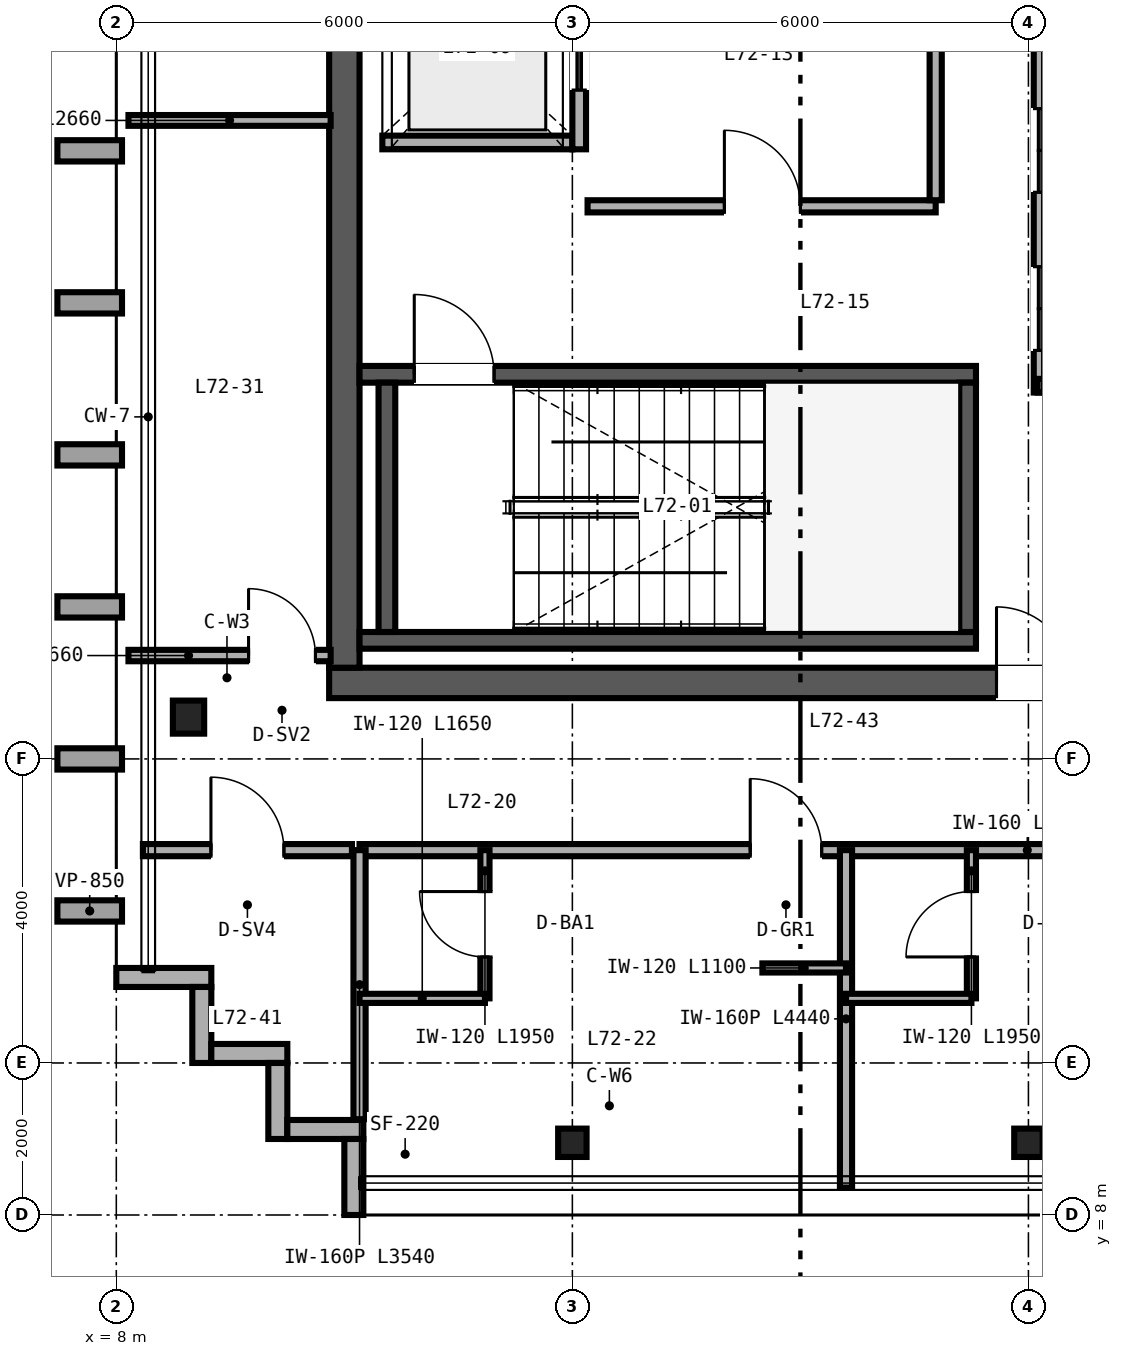
"""IFC4 building model, lengths in metres.
Left out: names, types, materials, properties, quantities, classifications, styles, units other than length and angle.
Written with IfcOpenShell. Run it as: python <this file> out.ifc"""

import sys

from ifc_helpers import new_model, si_unit, direction, frame, frame_2d, origin, origin_2d, place, context, subcontext, project, spatial, rectangle, i_section, extrude, source, transform, mapped, element, fill, save


model = new_model("IFC4")
c1 = context("Model", 3, precision=1e-05, world=origin(), true_north=direction((0.0, 1.0)))
c2 = subcontext(c1, "Body", "Model", "MODEL_VIEW")
j1 = project(units=[si_unit("LENGTHUNIT", "METRE"), si_unit("PLANEANGLEUNIT", "RADIAN")], contexts=[c1])
p1 = place(None, origin())
s1 = spatial("IfcSite", under=j1, at=p1, CompositionType="ELEMENT")
p2 = place(p1, origin())
s2 = spatial("IfcBuilding", under=s1, at=p2, CompositionType="ELEMENT")
p3 = place(p2, frame((0.0, 0.0, 283.2)))
s3 = spatial("IfcBuildingStorey", under=s2, at=p3, CompositionType="ELEMENT", Elevation=283.2)
p4 = place(p3, frame((10.8, 15.0, 0.0), z_axis=(0.0, 0.0, 1.0), x_axis=(1.0, 0.0, 0.0)))
e1 = element("IfcWall", 1, at=p4, inside=s3, PredefinedType="SHEAR", context=c2, shape_type="SweptSolid", body=[
    extrude(rectangle(XDim=12.4, YDim=0.4, at=frame_2d((6.2, 0.0))), origin(), (0.0, 0.0, 1.0), 3.38),
])
p5 = place(p4, frame((8.78, 0.0, 0.0)))
e2 = element("IfcOpeningElement", 2, at=p5, cuts=e1, PredefinedType="OPENING", context=c2, shape_type="SweptSolid", body=[
    extrude(rectangle(XDim=1.0, YDim=2.15, at=frame_2d((0.5, 1.075))), frame((0.0, 0.21, 0.0), z_axis=(0.0, -1.0, 0.0), x_axis=(1.0, 0.0, 0.0)), (0.0, 0.0, 1.0), 0.42),
])
p6 = place(p3, frame((11.0, 15.2, 0.0), z_axis=(0.0, 0.0, 1.0), x_axis=(0.0, 1.0, 0.0)))
e3 = element("IfcWall", 3, at=p6, inside=s3, PredefinedType="SHEAR", context=c2, shape_type="SweptSolid", body=[
    extrude(rectangle(XDim=21.6, YDim=0.4, at=frame_2d((10.8, 0.0))), origin(), (0.0, 0.0, 1.0), 3.38),
])
p7 = place(p3, frame((11.2, 15.56, 0.0), z_axis=(0.0, 0.0, 1.0), x_axis=(1.0, 0.0, 0.0)))
e4 = element("IfcWall", 4, at=p7, inside=s3, PredefinedType="SHEAR", context=c2, shape_type="SweptSolid", body=[
    extrude(rectangle(XDim=8.11, YDim=0.22, at=frame_2d((4.055, 0.0))), origin(), (0.0, 0.0, 1.0), 3.4),
])
p8 = place(p3, frame((11.2, 19.06, 0.0), z_axis=(0.0, 0.0, 1.0), x_axis=(1.0, 0.0, 0.0)))
e5 = element("IfcWall", 5, at=p8, inside=s3, PredefinedType="SHEAR", context=c2, shape_type="SweptSolid", body=[
    extrude(rectangle(XDim=8.11, YDim=0.22, at=frame_2d((4.055, 0.0))), origin(), (0.0, 0.0, 1.0), 3.4),
])
p9 = place(p8, frame((0.72, 0.0, 0.0)))
e6 = element("IfcOpeningElement", 6, at=p9, cuts=e5, PredefinedType="OPENING", context=c2, shape_type="SweptSolid", body=[
    extrude(rectangle(XDim=1.05, YDim=2.15, at=frame_2d((0.525, 1.075))), frame((0.0, 0.12, 0.0), z_axis=(0.0, -1.0, 0.0), x_axis=(1.0, 0.0, 0.0)), (0.0, 0.0, 1.0), 0.24),
])
for number, where, z_axis, x_axis in (
    (7, (11.56, 15.67, 0.0), (0.0, 0.0, 1.0), (0.0, 1.0, 0.0)),
    (8, (19.2, 15.67, 0.0), (0.0, 0.0, 1.0), (0.0, 1.0, 0.0)),
):
    element("IfcWall", number, at=place(p3, frame(where, z_axis=z_axis, x_axis=x_axis)), inside=s3, PredefinedType="SHEAR", context=c2, shape_type="SweptSolid", body=[
        extrude(rectangle(XDim=3.28, YDim=0.22, at=frame_2d((1.64, 0.0))), origin(), (0.0, 0.0, 1.0), 3.4),
    ])
m1 = source(origin(), c2, "Body", "SweptSolid", [
    extrude(i_section(OverallWidth=0.412, OverallDepth=0.435, WebThickness=0.036, FlangeThickness=0.057, FilletRadius=0.025, at=origin_2d()), origin(), (0.0, 0.0, 1.0), 3.38),
])
p10 = place(p3, frame((8.95, 14.55, 0.0), z_axis=(0.0, 0.0, 1.0), x_axis=(1.0, 0.0, 0.0)))
e9 = element("IfcColumn", 9, at=p10, inside=s3, PredefinedType="COLUMN", context=c2, shape_type="MappedRepresentation", body=[
    mapped(m1, transform((0.0, 0.0, 0.0), scale=1.0)),
])
m2 = source(origin(), c2, "Body", "SweptSolid", [
    extrude(i_section(OverallWidth=0.374, OverallDepth=0.373, WebThickness=0.016, FlangeThickness=0.026, FilletRadius=0.025, at=origin_2d()), origin(), (0.0, 0.0, 1.0), 3.38),
])
for number, where, z_axis, x_axis in (
    (10, (14.0, 8.95, 0.0), (0.0, 0.0, 1.0), (1.0, 0.0, 0.0)),
    (11, (20.0, 8.95, 0.0), (0.0, 0.0, 1.0), (1.0, 0.0, 0.0)),
):
    element("IfcColumn", number, at=place(p3, frame(where, z_axis=z_axis, x_axis=x_axis)), inside=s3, PredefinedType="COLUMN", context=c2, shape_type="MappedRepresentation", body=[
        mapped(m2, transform((0.0, 0.0, 0.0), scale=1.0)),
    ])
p11 = place(p3, frame((8.0, 11.125, 0.0), z_axis=(0.0, 0.0, 1.0), x_axis=(1.0, 0.0, 0.0)))
e12 = element("IfcWall", 12, at=p11, inside=s3, PredefinedType="SOLIDWALL", context=c2, shape_type="SweptSolid", body=[
    extrude(rectangle(XDim=1.25, YDim=0.25, at=frame_2d((0.625, 0.0))), origin(), (0.0, 0.0, 1.0), 3.38),
])
for number, where, z_axis, x_axis in (
    (13, (9.125, 11.0, 0.0), (0.0, 0.0, 1.0), (0.0, -1.0, 0.0)),
    (14, (9.25, 10.125, 0.0), (0.0, 0.0, 1.0), (1.0, 0.0, 0.0)),
    (15, (10.125, 10.0, 0.0), (0.0, 0.0, 1.0), (0.0, -1.0, 0.0)),
    (16, (10.25, 9.125, 0.0), (0.0, 0.0, 1.0), (1.0, 0.0, 0.0)),
    (17, (11.125, 9.0, 0.0), (0.0, 0.0, 1.0), (0.0, -1.0, 0.0)),
):
    element("IfcWall", number, at=place(p3, frame(where, z_axis=z_axis, x_axis=x_axis)), inside=s3, PredefinedType="SOLIDWALL", context=c2, shape_type="SweptSolid", body=[
        extrude(rectangle(XDim=1.0, YDim=0.25, at=frame_2d((0.5, 0.0))), origin(), (0.0, 0.0, 1.0), 3.38),
    ])
p12 = place(p3, frame((20.16, 18.82, 0.0), z_axis=(0.0, 0.0, 1.0), x_axis=(0.0, 1.0, 0.0)))
e18 = element("IfcWall", 18, at=p12, inside=s3, PredefinedType="SOLIDWALL", context=c2, shape_type="SweptSolid", body=[
    extrude(rectangle(XDim=6.32, YDim=0.18, at=frame_2d((3.16, 0.0))), origin(), (0.0, 0.0, 1.0), 2.48),
])
p13 = place(p12, frame((0.555, 0.0, 0.0)))
e19 = element("IfcOpeningElement", 19, at=p13, cuts=e18, PredefinedType="OPENING", context=c2, shape_type="SweptSolid", body=[
    extrude(rectangle(XDim=1.1, YDim=2.2, at=frame_2d((0.55, 1.1))), frame((0.0, 0.1, 0.0), z_axis=(0.0, -1.0, 0.0), x_axis=(1.0, 0.0, 0.0)), (0.0, 0.0, 1.0), 0.2),
])
p14 = place(p12, frame((2.635, 0.0, 0.0)))
e20 = element("IfcOpeningElement", 20, at=p14, cuts=e18, PredefinedType="OPENING", context=c2, shape_type="SweptSolid", body=[
    extrude(rectangle(XDim=1.1, YDim=2.2, at=frame_2d((0.55, 1.1))), frame((0.0, 0.1, 0.0), z_axis=(0.0, -1.0, 0.0), x_axis=(1.0, 0.0, 0.0)), (0.0, 0.0, 1.0), 0.2),
])
p15 = place(p12, frame((4.69, 0.0, 0.0)))
e21 = element("IfcOpeningElement", 21, at=p15, cuts=e18, PredefinedType="OPENING", context=c2, shape_type="SweptSolid", body=[
    extrude(rectangle(XDim=1.1, YDim=2.2, at=frame_2d((0.55, 1.1))), frame((0.0, 0.1, 0.0), z_axis=(0.0, -1.0, 0.0), x_axis=(1.0, 0.0, 0.0)), (0.0, 0.0, 1.0), 0.2),
])
p16 = place(p3, frame((20.12, 18.91, 0.0), z_axis=(0.0, 0.0, 1.0), x_axis=(1.0, 0.0, 0.0)))
e22 = element("IfcWall", 22, at=p16, inside=s3, PredefinedType="SOLIDWALL", context=c2, shape_type="SweptSolid", body=[
    extrude(rectangle(XDim=2.63, YDim=0.18, at=frame_2d((1.315, 0.0))), origin(), (0.0, 0.0, 1.0), 3.38),
])
p17 = place(p3, frame((11.5, 22.11, 0.0), z_axis=(0.0, 0.0, 1.0), x_axis=(1.0, 0.0, 0.0)))
e23 = element("IfcWall", 23, at=p17, inside=s3, PredefinedType="SOLIDWALL", context=c2, shape_type="SweptSolid", body=[
    extrude(rectangle(XDim=2.5, YDim=0.18, at=frame_2d((1.25, 0.0))), origin(), (0.0, 0.0, 1.0), 3.38),
])
p18 = place(p3, frame((14.09, 22.02, 0.0), z_axis=(0.0, 0.0, 1.0), x_axis=(0.0, 1.0, 0.0)))
e24 = element("IfcWall", 24, at=p18, inside=s3, PredefinedType="SOLIDWALL", context=c2, shape_type="SweptSolid", body=[
    extrude(rectangle(XDim=2.66, YDim=0.18, at=frame_2d((1.33, 0.0))), origin(), (0.0, 0.0, 1.0), 3.38),
])
p19 = place(p18, frame((0.78, 0.0, 0.0)))
e25 = element("IfcOpeningElement", 25, at=p19, cuts=e24, PredefinedType="OPENING", context=c2, shape_type="SweptSolid", body=[
    extrude(rectangle(XDim=1.1, YDim=2.2, at=frame_2d((0.55, 1.1))), frame((0.0, 0.1, 0.0), z_axis=(0.0, -1.0, 0.0), x_axis=(1.0, 0.0, 0.0)), (0.0, 0.0, 1.0), 0.2),
])
p20 = place(p3, frame((14.2, 21.27, 0.0), z_axis=(0.0, 0.0, 1.0), x_axis=(1.0, 0.0, 0.0)))
e26 = element("IfcWall", 26, at=p20, inside=s3, PredefinedType="PARTITIONING", context=c2, shape_type="SweptSolid", body=[
    extrude(rectangle(XDim=4.58, YDim=0.16, at=frame_2d((2.29, 0.0))), origin(), (0.0, 0.0, 1.0), 3.38),
])
p21 = place(p20, frame((1.8, 0.0, 0.0)))
e27 = element("IfcOpeningElement", 27, at=p21, cuts=e26, PredefinedType="OPENING", context=c2, shape_type="SweptSolid", body=[
    extrude(rectangle(XDim=1.0, YDim=2.15, at=frame_2d((0.5, 1.075))), frame((0.0, 0.09, 0.0), z_axis=(0.0, -1.0, 0.0), x_axis=(1.0, 0.0, 0.0)), (0.0, 0.0, 1.0), 0.18),
])
p22 = place(p3, frame((18.78, 21.35, 0.0), z_axis=(0.0, 0.0, 1.0), x_axis=(0.0, 1.0, 0.0)))
e28 = element("IfcWall", 28, at=p22, inside=s3, PredefinedType="PARTITIONING", context=c2, shape_type="SweptSolid", body=[
    extrude(rectangle(XDim=3.81, YDim=0.16, at=frame_2d((1.905, 0.0))), origin(), (0.0, 0.0, 1.0), 3.38),
])
p23 = place(p3, frame((11.2, 12.8, 0.0), z_axis=(0.0, 0.0, 1.0), x_axis=(1.0, 0.0, 0.0)))
e29 = element("IfcWall", 29, at=p23, inside=s3, PredefinedType="PARTITIONING", context=c2, shape_type="SweptSolid", body=[
    extrude(rectangle(XDim=12.75, YDim=0.16, at=frame_2d((6.375, 0.0))), origin(), (0.0, 0.0, 1.0), 3.38),
])
p24 = place(p23, frame((5.14, 0.0, 0.0)))
e30 = element("IfcOpeningElement", 30, at=p24, cuts=e29, PredefinedType="OPENING", context=c2, shape_type="SweptSolid", body=[
    extrude(rectangle(XDim=0.94, YDim=2.15, at=frame_2d((0.47, 1.075))), frame((0.0, 0.09, 0.0), z_axis=(0.0, -1.0, 0.0), x_axis=(1.0, 0.0, 0.0)), (0.0, 0.0, 1.0), 0.18),
])
p25 = place(p23, frame((11.49, 0.0, 0.0)))
e31 = element("IfcOpeningElement", 31, at=p25, cuts=e29, PredefinedType="OPENING", context=c2, shape_type="SweptSolid", body=[
    extrude(rectangle(XDim=0.94, YDim=2.15, at=frame_2d((0.47, 1.075))), frame((0.0, 0.09, 0.0), z_axis=(0.0, -1.0, 0.0), x_axis=(1.0, 0.0, 0.0)), (0.0, 0.0, 1.0), 0.18),
])
p26 = place(p3, frame((11.2, 9.26, 0.0), z_axis=(0.0, 0.0, 1.0), x_axis=(0.0, 1.0, 0.0)))
e32 = element("IfcWall", 32, at=p26, inside=s3, PredefinedType="PARTITIONING", context=c2, shape_type="SweptSolid", body=[
    extrude(rectangle(XDim=3.54, YDim=0.16, at=frame_2d((1.77, 0.0))), origin(), (0.0, 0.0, 1.0), 3.38),
])
p27 = place(p3, frame((17.6, 8.36, 0.0), z_axis=(0.0, 0.0, 1.0), x_axis=(0.0, 1.0, 0.0)))
e33 = element("IfcWall", 33, at=p27, inside=s3, PredefinedType="PARTITIONING", context=c2, shape_type="SweptSolid", body=[
    extrude(rectangle(XDim=4.44, YDim=0.16, at=frame_2d((2.22, 0.0))), origin(), (0.0, 0.0, 1.0), 2.687),
])
p28 = place(p3, frame((12.85, 10.85, 0.0), z_axis=(0.0, 0.0, 1.0), x_axis=(0.0, 1.0, 0.0)))
e34 = element("IfcWall", 34, at=p28, inside=s3, PredefinedType="PARTITIONING", context=c2, shape_type="SweptSolid", body=[
    extrude(rectangle(XDim=1.95, YDim=0.12, at=frame_2d((0.975, 0.0))), origin(), (0.0, 0.0, 1.0), 3.38),
])
p29 = place(p28, frame((0.545, 0.0, 0.0)))
e35 = element("IfcOpeningElement", 35, at=p29, cuts=e34, PredefinedType="OPENING", context=c2, shape_type="SweptSolid", body=[
    extrude(rectangle(XDim=0.86, YDim=2.1, at=frame_2d((0.43, 1.05))), frame((0.0, 0.07, 0.0), z_axis=(0.0, -1.0, 0.0), x_axis=(1.0, 0.0, 0.0)), (0.0, 0.0, 1.0), 0.14),
])
p30 = place(p3, frame((11.2, 10.85, 0.0), z_axis=(0.0, 0.0, 1.0), x_axis=(1.0, 0.0, 0.0)))
e36 = element("IfcWall", 36, at=p30, inside=s3, PredefinedType="PARTITIONING", context=c2, shape_type="SweptSolid", body=[
    extrude(rectangle(XDim=1.65, YDim=0.12, at=frame_2d((0.825, 0.0))), origin(), (0.0, 0.0, 1.0), 3.38),
])
p31 = place(p3, frame((16.5, 11.25, 0.0), z_axis=(0.0, 0.0, 1.0), x_axis=(1.0, 0.0, 0.0)))
e37 = element("IfcWall", 37, at=p31, inside=s3, PredefinedType="PARTITIONING", context=c2, shape_type="SweptSolid", body=[
    extrude(rectangle(XDim=1.1, YDim=0.12, at=frame_2d((0.55, 0.0))), origin(), (0.0, 0.0, 1.0), 3.38),
])
p32 = place(p3, frame((19.25, 10.85, 0.0), z_axis=(0.0, 0.0, 1.0), x_axis=(0.0, 1.0, 0.0)))
e38 = element("IfcWall", 38, at=p32, inside=s3, PredefinedType="PARTITIONING", context=c2, shape_type="SweptSolid", body=[
    extrude(rectangle(XDim=1.95, YDim=0.12, at=frame_2d((0.975, 0.0))), origin(), (0.0, 0.0, 1.0), 3.38),
])
p33 = place(p32, frame((0.545, 0.0, 0.0)))
e39 = element("IfcOpeningElement", 39, at=p33, cuts=e38, PredefinedType="OPENING", context=c2, shape_type="SweptSolid", body=[
    extrude(rectangle(XDim=0.86, YDim=2.1, at=frame_2d((0.43, 1.05))), frame((0.0, 0.07, 0.0), z_axis=(0.0, -1.0, 0.0), x_axis=(1.0, 0.0, 0.0)), (0.0, 0.0, 1.0), 0.14),
])
p34 = place(p3, frame((17.6, 10.85, 0.0), z_axis=(0.0, 0.0, 1.0), x_axis=(1.0, 0.0, 0.0)))
e40 = element("IfcWall", 40, at=p34, inside=s3, PredefinedType="PARTITIONING", context=c2, shape_type="SweptSolid", body=[
    extrude(rectangle(XDim=1.65, YDim=0.12, at=frame_2d((0.825, 0.0))), origin(), (0.0, 0.0, 1.0), 3.38),
])
p35 = place(p3, frame((8.16, 15.36, 0.0), z_axis=(0.0, 0.0, 1.0), x_axis=(1.0, 0.0, 0.0)))
e41 = element("IfcWall", 41, at=p35, inside=s3, PredefinedType="PARTITIONING", context=c2, shape_type="SweptSolid", body=[
    extrude(rectangle(XDim=2.66, YDim=0.15, at=frame_2d((1.33, 0.0))), origin(), (0.0, 0.0, 1.0), 2.601),
])
p36 = place(p35, frame((1.58, 0.0, 0.0)))
e42 = element("IfcOpeningElement", 42, at=p36, cuts=e41, PredefinedType="OPENING", context=c2, shape_type="SweptSolid", body=[
    extrude(rectangle(XDim=0.88, YDim=2.15, at=frame_2d((0.44, 1.075))), frame((0.0, 0.085, 0.0), z_axis=(0.0, -1.0, 0.0), x_axis=(1.0, 0.0, 0.0)), (0.0, 0.0, 1.0), 0.17),
])
p37 = place(p3, frame((8.16, 22.4, 0.0), z_axis=(0.0, 0.0, 1.0), x_axis=(1.0, 0.0, 0.0)))
e43 = element("IfcWall", 43, at=p37, inside=s3, PredefinedType="PARTITIONING", context=c2, shape_type="SweptSolid", body=[
    extrude(rectangle(XDim=2.66, YDim=0.142, at=frame_2d((1.33, 0.0))), origin(), (0.0, 0.0, 1.0), 2.601),
])
p38 = place(p3, frame((8.35, 12.8, 0.0), z_axis=(0.0, 0.0, 1.0), x_axis=(1.0, 0.0, 0.0)))
e44 = element("IfcWall", 44, at=p38, inside=s3, PredefinedType="PARTITIONING", context=c2, shape_type="SweptSolid", body=[
    extrude(rectangle(XDim=2.75, YDim=0.16, at=frame_2d((1.375, 0.0))), origin(), (0.0, 0.0, 1.0), 3.38),
])
p39 = place(p38, frame((0.895, 0.0, 0.0)))
e45 = element("IfcOpeningElement", 45, at=p39, cuts=e44, PredefinedType="OPENING", context=c2, shape_type="SweptSolid", body=[
    extrude(rectangle(XDim=0.96, YDim=2.15, at=frame_2d((0.48, 1.075))), frame((0.0, 0.09, 0.0), z_axis=(0.0, -1.0, 0.0), x_axis=(1.0, 0.0, 0.0)), (0.0, 0.0, 1.0), 0.18),
])
m3 = source(origin(), c2, "Body", "SweptSolid", [
    extrude(rectangle(XDim=1.05, YDim=2.15, at=frame_2d((0.525, 1.075))), frame((0.0, 0.025, 0.0), z_axis=(0.0, -1.0, 0.0), x_axis=(1.0, 0.0, 0.0)), (0.0, 0.0, 1.0), 0.05),
])
p40 = place(p9, origin())
e46 = element("IfcDoor", 46, at=p40, inside=s3, OperationType="SINGLE_SWING_LEFT", PredefinedType="DOOR", context=c2, shape_type="MappedRepresentation", body=[
    mapped(m3, transform((0.0, 0.0, 0.0), scale=1.0)),
])
fill(e6, e46)
m4 = source(origin(), c2, "Body", "SweptSolid", [
    extrude(rectangle(XDim=1.1, YDim=2.2, at=frame_2d((0.55, 1.1))), frame((0.0, 0.025, 0.0), z_axis=(0.0, -1.0, 0.0), x_axis=(1.0, 0.0, 0.0)), (0.0, 0.0, 1.0), 0.05),
])
p41 = place(p13, origin())
e47 = element("IfcDoor", 47, at=p41, inside=s3, OperationType="DOUBLE_DOOR_SLIDING", PredefinedType="DOOR", context=c2, shape_type="MappedRepresentation", body=[
    mapped(m4, transform((0.0, 0.0, 0.0), scale=1.0)),
])
fill(e19, e47)
p42 = place(p14, origin())
e48 = element("IfcDoor", 48, at=p42, inside=s3, OperationType="DOUBLE_DOOR_SLIDING", PredefinedType="DOOR", context=c2, shape_type="MappedRepresentation", body=[
    mapped(m4, transform((0.0, 0.0, 0.0), scale=1.0)),
])
fill(e20, e48)
p43 = place(p19, origin())
e49 = element("IfcDoor", 49, at=p43, inside=s3, OperationType="DOUBLE_DOOR_SLIDING", PredefinedType="DOOR", context=c2, shape_type="MappedRepresentation", body=[
    mapped(m4, transform((0.0, 0.0, 0.0), scale=1.0)),
])
fill(e25, e49)
m5 = source(origin(), c2, "Body", "SweptSolid", [
    extrude(rectangle(XDim=1.0, YDim=2.15, at=frame_2d((0.5, 1.075))), frame((0.0, 0.025, 0.0), z_axis=(0.0, -1.0, 0.0), x_axis=(1.0, 0.0, 0.0)), (0.0, 0.0, 1.0), 0.05),
])
p44 = place(p21, origin())
e50 = element("IfcDoor", 50, at=p44, inside=s3, OperationType="SINGLE_SWING_LEFT", PredefinedType="DOOR", context=c2, shape_type="MappedRepresentation", body=[
    mapped(m5, transform((0.0, 0.0, 0.0), scale=1.0)),
])
fill(e27, e50)
p45 = place(p5, origin())
e51 = element("IfcDoor", 51, at=p45, inside=s3, OperationType="SINGLE_SWING_LEFT", PredefinedType="DOOR", context=c2, shape_type="MappedRepresentation", body=[
    mapped(m5, transform((0.0, 0.0, 0.0), scale=1.0)),
])
fill(e2, e51)
m6 = source(origin(), c2, "Body", "SweptSolid", [
    extrude(rectangle(XDim=0.86, YDim=2.1, at=frame_2d((0.43, 1.05))), frame((0.0, 0.025, 0.0), z_axis=(0.0, -1.0, 0.0), x_axis=(1.0, 0.0, 0.0)), (0.0, 0.0, 1.0), 0.05),
])
p46 = place(p29, origin())
e52 = element("IfcDoor", 52, at=p46, inside=s3, OperationType="SINGLE_SWING_RIGHT", PredefinedType="DOOR", context=c2, shape_type="MappedRepresentation", body=[
    mapped(m6, transform((0.0, 0.0, 0.0), scale=1.0)),
])
fill(e35, e52)
p47 = place(p33, origin())
e53 = element("IfcDoor", 53, at=p47, inside=s3, OperationType="SINGLE_SWING_LEFT", PredefinedType="DOOR", context=c2, shape_type="MappedRepresentation", body=[
    mapped(m6, transform((0.0, 0.0, 0.0), scale=1.0)),
])
fill(e39, e53)
m7 = source(origin(), c2, "Body", "SweptSolid", [
    extrude(rectangle(XDim=0.94, YDim=2.15, at=frame_2d((0.47, 1.075))), frame((0.0, 0.025, 0.0), z_axis=(0.0, -1.0, 0.0), x_axis=(1.0, 0.0, 0.0)), (0.0, 0.0, 1.0), 0.05),
])
p48 = place(p24, origin())
e54 = element("IfcDoor", 54, at=p48, inside=s3, OperationType="SINGLE_SWING_LEFT", PredefinedType="DOOR", context=c2, shape_type="MappedRepresentation", body=[
    mapped(m7, transform((0.0, 0.0, 0.0), scale=1.0)),
])
fill(e30, e54)
m8 = source(origin(), c2, "Body", "SweptSolid", [
    extrude(rectangle(XDim=0.88, YDim=2.15, at=frame_2d((0.44, 1.075))), frame((0.0, 0.025, 0.0), z_axis=(0.0, -1.0, 0.0), x_axis=(1.0, 0.0, 0.0)), (0.0, 0.0, 1.0), 0.05),
])
p49 = place(p36, origin())
e55 = element("IfcDoor", 55, at=p49, inside=s3, OperationType="SINGLE_SWING_LEFT", PredefinedType="DOOR", context=c2, shape_type="MappedRepresentation", body=[
    mapped(m8, transform((0.0, 0.0, 0.0), scale=1.0)),
])
fill(e42, e55)
m9 = source(origin(), c2, "Body", "SweptSolid", [
    extrude(rectangle(XDim=0.96, YDim=2.15, at=frame_2d((0.48, 1.075))), frame((0.0, 0.025, 0.0), z_axis=(0.0, -1.0, 0.0), x_axis=(1.0, 0.0, 0.0)), (0.0, 0.0, 1.0), 0.05),
])
p50 = place(p39, origin())
e56 = element("IfcDoor", 56, at=p50, inside=s3, OperationType="SINGLE_SWING_LEFT", PredefinedType="DOOR", context=c2, shape_type="MappedRepresentation", body=[
    mapped(m9, transform((0.0, 0.0, 0.0), scale=1.0)),
])
fill(e45, e56)
save(model, sys.argv[1])
